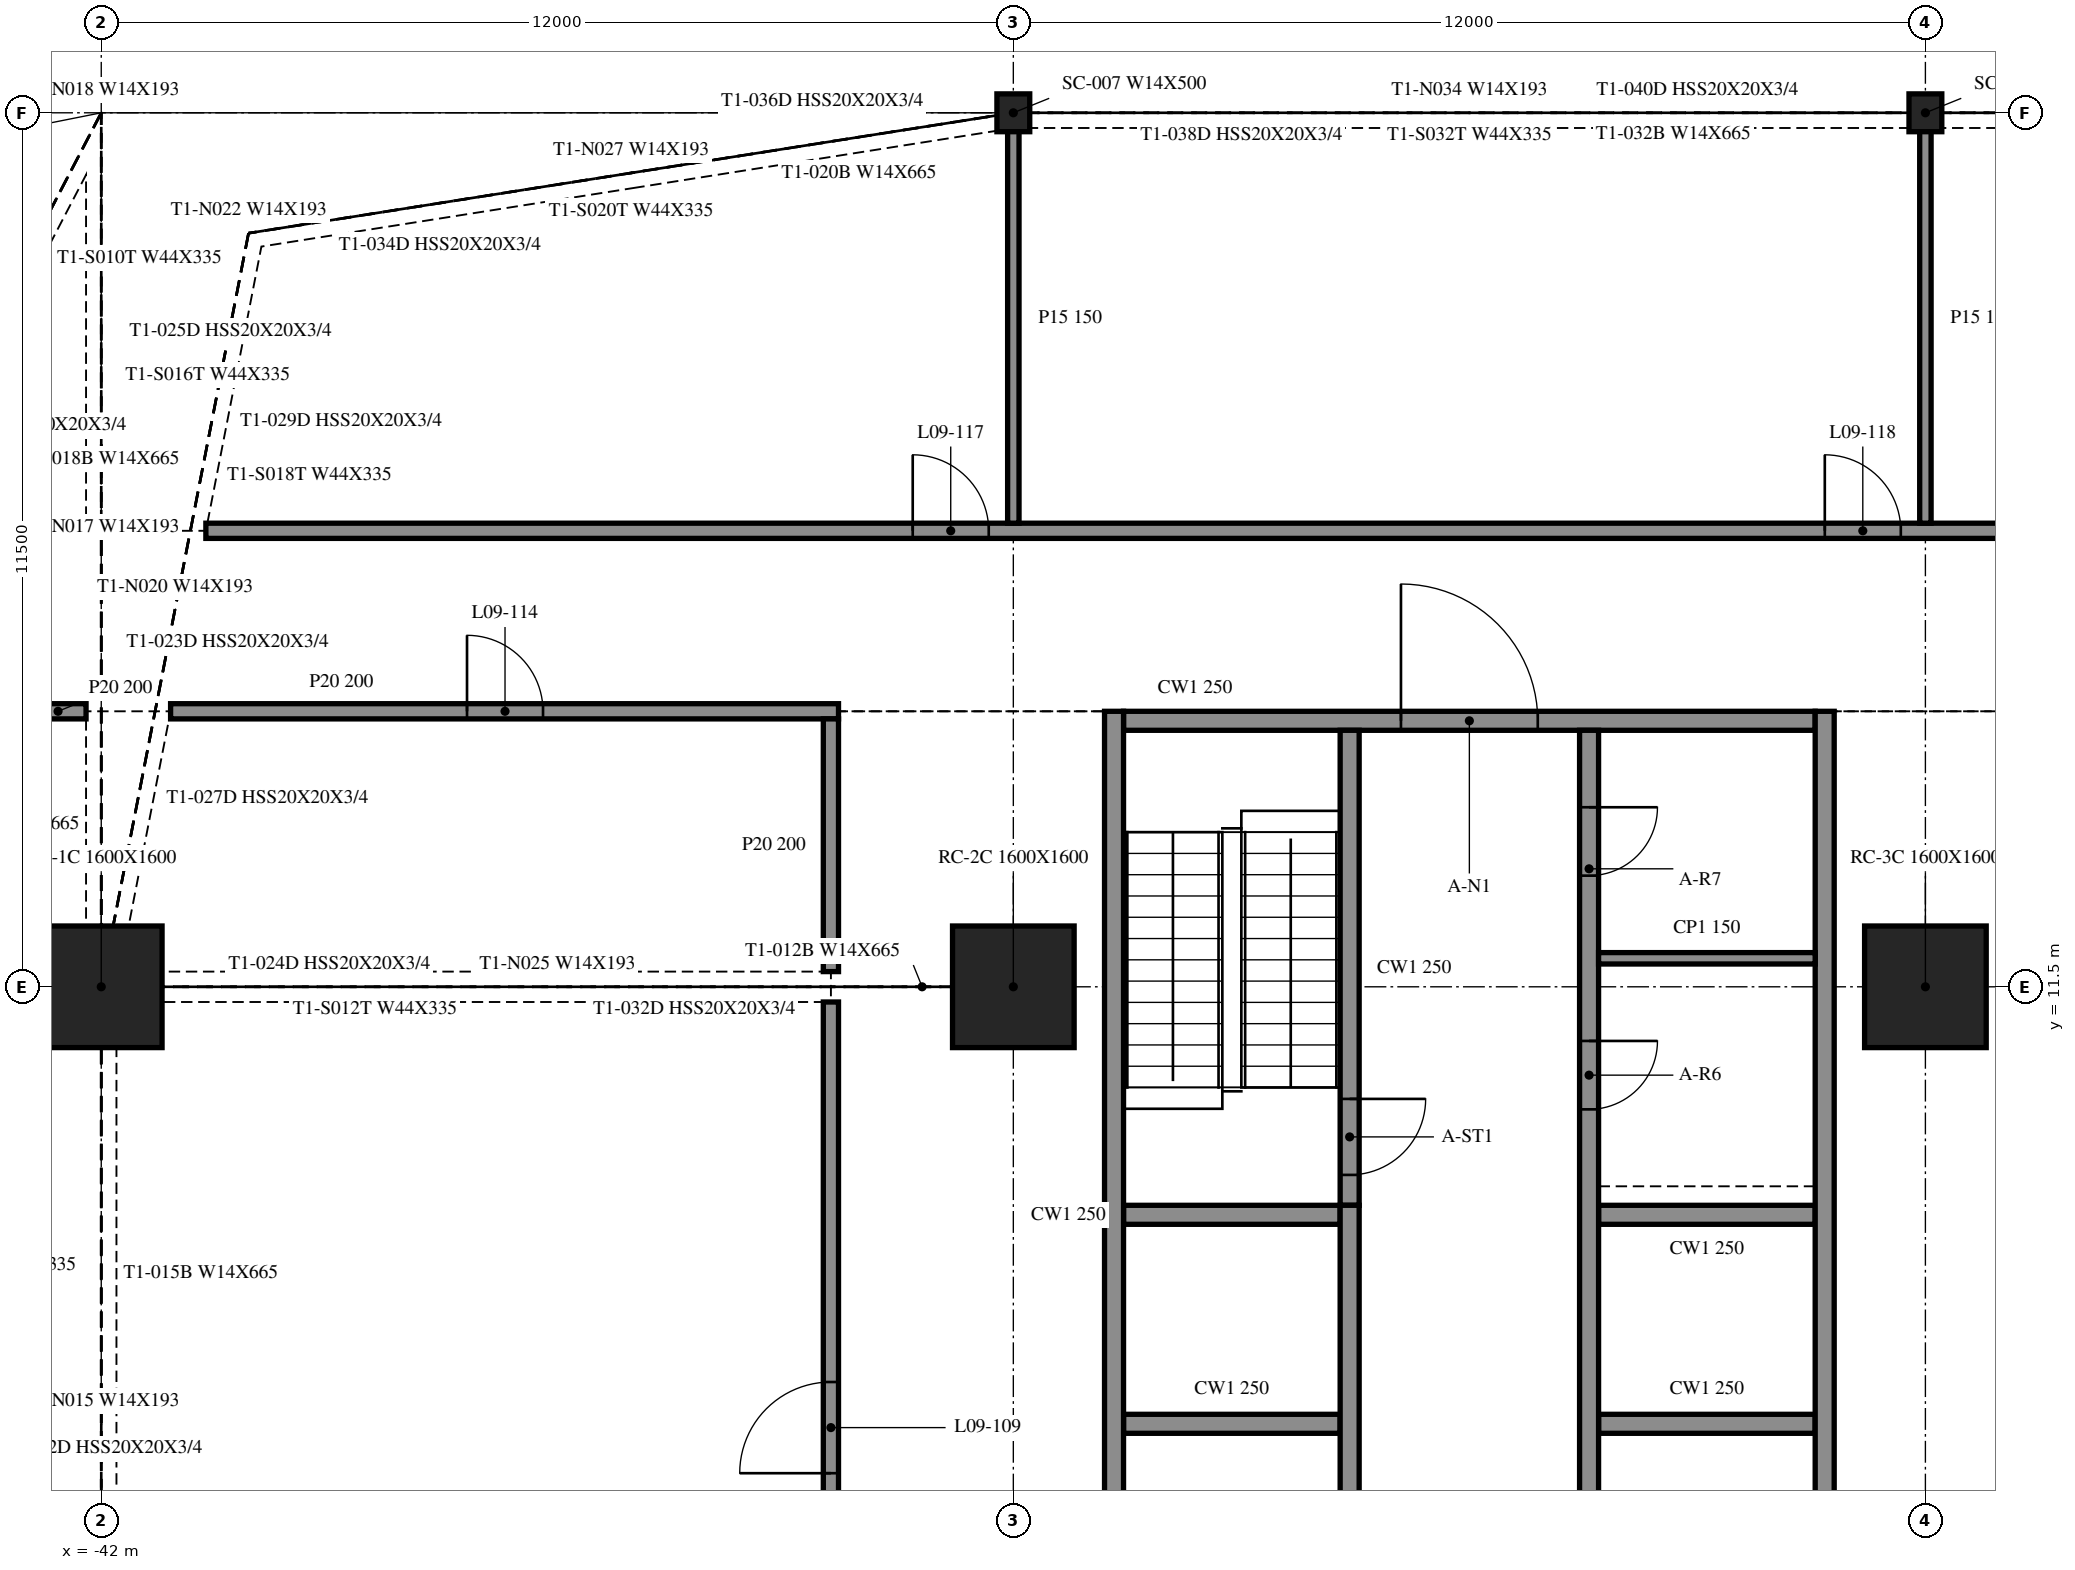
"""IFC4 building model, lengths in metres.
Left out: names, types, materials, properties, quantities, classifications, styles, units other than length and angle.
Written with IfcOpenShell. Run it as: python <this file> out.ifc"""

import sys

from ifc_helpers import new_model, si_unit, direction, frame, frame_2d, origin, origin_2d, place, context, subcontext, project, spatial, rectangle, i_section, extrude, element, fill, save


model = new_model("IFC4")
c1 = context("Model", 3, precision=1e-05, world=origin(), true_north=direction((0.0, 1.0)))
c2 = subcontext(c1, "Body", "Model", "MODEL_VIEW")
j1 = project(units=[si_unit("LENGTHUNIT", "METRE"), si_unit("PLANEANGLEUNIT", "RADIAN")], contexts=[c1])
p1 = place(None, origin())
s1 = spatial("IfcSite", under=j1, at=p1, CompositionType="ELEMENT")
p2 = place(p1, origin())
s2 = spatial("IfcBuilding", under=s1, at=p2, CompositionType="ELEMENT")
p3 = place(p2, frame((0.0, 0.0, 41.6)))
s3 = spatial("IfcBuildingStorey", under=s2, at=p3, CompositionType="ELEMENT", Elevation=41.6)
for number, where, z_axis, x_axis in (
    (1, (-42.0, 11.5, -0.55), (0.0, 0.0, 1.0), (1.0, 0.0, 0.0)),
    (2, (-30.0, 11.5, -0.55), (0.0, 0.0, 1.0), (1.0, 0.0, 0.0)),
    (3, (-18.0, 11.5, -0.55), (0.0, 0.0, 1.0), (1.0, 0.0, 0.0)),
):
    element("IfcColumn", number, at=place(p3, frame(where, z_axis=z_axis, x_axis=x_axis)), inside=s3, PredefinedType="COLUMN", context=c2, shape_type="SweptSolid", body=[
        extrude(rectangle(XDim=1.6, YDim=1.6, at=origin_2d()), origin(), (0.0, 0.0, 1.0), 4.61),
    ])
for number, where, z_axis, x_axis in (
    (4, (-18.0, 23.0, -0.55), (0.0, 0.0, 1.0), (1.0, 0.0, 0.0)),
    (5, (-30.0, 23.0, -0.55), (0.0, 0.0, 1.0), (1.0, 0.0, 0.0)),
):
    element("IfcColumn", number, at=place(p3, frame(where, z_axis=z_axis, x_axis=x_axis)), inside=s3, PredefinedType="COLUMN", context=c2, shape_type="SweptSolid", body=[
        extrude(i_section(OverallWidth=0.432, OverallDepth=0.498, WebThickness=0.056, FlangeThickness=0.089, at=origin_2d()), origin(), (0.0, 0.0, 1.0), 4.61),
    ])
for number, where, z_axis, x_axis in (
    (6, (-28.675, 15.125, 0.0), (0.0, 0.0, 1.0), (0.0, -1.0, 0.0)),
    (7, (-19.325, -9.125, 0.0), (0.0, 0.0, 1.0), (0.0, 1.0, 0.0)),
):
    element("IfcWall", number, at=place(p3, frame(where, z_axis=z_axis, x_axis=x_axis)), inside=s3, PredefinedType="SOLIDWALL", context=c2, shape_type="SweptSolid", body=[
        extrude(rectangle(XDim=24.25, YDim=0.25, at=frame_2d((12.125, 0.0))), origin(), (0.0, 0.0, 1.0), 4.06),
    ])
p4 = place(p3, frame((-28.55, 15.0, 0.0), z_axis=(0.0, 0.0, 1.0), x_axis=(1.0, 0.0, 0.0)))
e8 = element("IfcWall", 8, at=p4, inside=s3, PredefinedType="SOLIDWALL", context=c2, shape_type="SweptSolid", body=[
    extrude(rectangle(XDim=9.1, YDim=0.25, at=frame_2d((4.55, 0.0))), origin(), (0.0, 0.0, 1.0), 4.06),
])
p5 = place(p4, frame((3.65, 0.0, 0.0)))
e9 = element("IfcOpeningElement", 9, at=p5, cuts=e8, PredefinedType="OPENING", context=c2, shape_type="SweptSolid", body=[
    extrude(rectangle(XDim=1.8, YDim=2.1, at=frame_2d((0.9, 1.05))), frame((0.0, 0.135, 0.0), z_axis=(0.0, -1.0, 0.0), x_axis=(1.0, 0.0, 0.0)), (0.0, 0.0, 1.0), 0.27),
])
p6 = place(p3, frame((-25.575, -8.875, 0.0), z_axis=(0.0, 0.0, 1.0), x_axis=(0.0, 1.0, 0.0)))
e10 = element("IfcWall", 10, at=p6, inside=s3, PredefinedType="SOLIDWALL", context=c2, shape_type="SweptSolid", body=[
    extrude(rectangle(XDim=17.5, YDim=0.25, at=frame_2d((8.75, 0.0))), origin(), (0.0, 0.0, 1.0), 4.06),
])
p7 = place(p6, frame((0.512, 0.0, 0.0)))
e11 = element("IfcOpeningElement", 11, at=p7, cuts=e10, PredefinedType="OPENING", context=c2, shape_type="SweptSolid", body=[
    extrude(rectangle(XDim=0.9, YDim=2.1, at=frame_2d((0.45, 1.05))), frame((0.0, 0.135, 0.0), z_axis=(0.0, -1.0, 0.0), x_axis=(1.0, 0.0, 0.0)), (0.0, 0.0, 1.0), 0.27),
])
p8 = place(p6, frame((2.55, 0.0, 0.0)))
e12 = element("IfcOpeningElement", 12, at=p8, cuts=e10, PredefinedType="OPENING", context=c2, shape_type="SweptSolid", body=[
    extrude(rectangle(XDim=0.9, YDim=2.1, at=frame_2d((0.45, 1.05))), frame((0.0, 0.135, 0.0), z_axis=(0.0, -1.0, 0.0), x_axis=(1.0, 0.0, 0.0)), (0.0, 0.0, 1.0), 0.27),
])
p9 = place(p6, frame((4.587, 0.0, 0.0)))
e13 = element("IfcOpeningElement", 13, at=p9, cuts=e10, PredefinedType="OPENING", context=c2, shape_type="SweptSolid", body=[
    extrude(rectangle(XDim=0.9, YDim=2.1, at=frame_2d((0.45, 1.05))), frame((0.0, 0.135, 0.0), z_axis=(0.0, -1.0, 0.0), x_axis=(1.0, 0.0, 0.0)), (0.0, 0.0, 1.0), 0.27),
])
p10 = place(p3, frame((-25.575, 14.875, 0.0), z_axis=(0.0, 0.0, 1.0), x_axis=(0.0, -1.0, 0.0)))
e14 = element("IfcWall", 14, at=p10, inside=s3, PredefinedType="SOLIDWALL", context=c2, shape_type="SweptSolid", body=[
    extrude(rectangle(XDim=6.25, YDim=0.25, at=frame_2d((3.125, 0.0))), origin(), (0.0, 0.0, 1.0), 4.06),
])
p11 = place(p10, frame((4.85, 0.0, 0.0)))
e15 = element("IfcOpeningElement", 15, at=p11, cuts=e14, PredefinedType="OPENING", context=c2, shape_type="SweptSolid", body=[
    extrude(rectangle(XDim=1.0, YDim=2.1, at=frame_2d((0.5, 1.05))), frame((0.0, 0.135, 0.0), z_axis=(0.0, -1.0, 0.0), x_axis=(1.0, 0.0, 0.0)), (0.0, 0.0, 1.0), 0.27),
])
p12 = place(p3, frame((-22.425, 14.875, 0.0), z_axis=(0.0, 0.0, 1.0), x_axis=(0.0, -1.0, 0.0)))
e16 = element("IfcWall", 16, at=p12, inside=s3, PredefinedType="SOLIDWALL", context=c2, shape_type="SweptSolid", body=[
    extrude(rectangle(XDim=23.75, YDim=0.25, at=frame_2d((11.875, 0.0))), origin(), (0.0, 0.0, 1.0), 4.06),
])
p13 = place(p12, frame((21.597, 0.0, 0.0)))
e17 = element("IfcOpeningElement", 17, at=p13, cuts=e16, PredefinedType="OPENING", context=c2, shape_type="SweptSolid", body=[
    extrude(rectangle(XDim=0.9, YDim=2.1, at=frame_2d((0.45, 1.05))), frame((0.0, 0.135, 0.0), z_axis=(0.0, -1.0, 0.0), x_axis=(1.0, 0.0, 0.0)), (0.0, 0.0, 1.0), 0.27),
])
p14 = place(p12, frame((18.522, 0.0, 0.0)))
e18 = element("IfcOpeningElement", 18, at=p14, cuts=e16, PredefinedType="OPENING", context=c2, shape_type="SweptSolid", body=[
    extrude(rectangle(XDim=0.9, YDim=2.1, at=frame_2d((0.45, 1.05))), frame((0.0, 0.135, 0.0), z_axis=(0.0, -1.0, 0.0), x_axis=(1.0, 0.0, 0.0)), (0.0, 0.0, 1.0), 0.27),
])
p15 = place(p12, frame((4.087, 0.0, 0.0)))
e19 = element("IfcOpeningElement", 19, at=p15, cuts=e16, PredefinedType="OPENING", context=c2, shape_type="SweptSolid", body=[
    extrude(rectangle(XDim=0.9, YDim=2.1, at=frame_2d((0.45, 1.05))), frame((0.0, 0.135, 0.0), z_axis=(0.0, -1.0, 0.0), x_axis=(1.0, 0.0, 0.0)), (0.0, 0.0, 1.0), 0.27),
])
p16 = place(p12, frame((1.012, 0.0, 0.0)))
e20 = element("IfcOpeningElement", 20, at=p16, cuts=e16, PredefinedType="OPENING", context=c2, shape_type="SweptSolid", body=[
    extrude(rectangle(XDim=0.9, YDim=2.1, at=frame_2d((0.45, 1.05))), frame((0.0, 0.135, 0.0), z_axis=(0.0, -1.0, 0.0), x_axis=(1.0, 0.0, 0.0)), (0.0, 0.0, 1.0), 0.27),
])
for number, where, z_axis, x_axis in (
    (21, (-28.55, 5.75, 0.0), (0.0, 0.0, 1.0), (1.0, 0.0, 0.0)),
    (22, (-28.55, 8.5, 0.0), (0.0, 0.0, 1.0), (1.0, 0.0, 0.0)),
    (23, (-22.3, 5.75, 0.0), (0.0, 0.0, 1.0), (1.0, 0.0, 0.0)),
    (24, (-22.3, 8.5, 0.0), (0.0, 0.0, 1.0), (1.0, 0.0, 0.0)),
):
    element("IfcWall", number, at=place(p3, frame(where, z_axis=z_axis, x_axis=x_axis)), inside=s3, PredefinedType="SOLIDWALL", context=c2, shape_type="SweptSolid", body=[
        extrude(rectangle(XDim=2.85, YDim=0.25, at=frame_2d((1.425, 0.0))), origin(), (0.0, 0.0, 1.0), 4.06),
    ])
p17 = place(p3, frame((-22.3, 11.875, 0.0), z_axis=(0.0, 0.0, 1.0), x_axis=(1.0, 0.0, 0.0)))
e25 = element("IfcWall", 25, at=p17, inside=s3, PredefinedType="PARTITIONING", context=c2, shape_type="SweptSolid", body=[
    extrude(rectangle(XDim=2.85, YDim=0.15, at=frame_2d((1.425, 0.0))), origin(), (0.0, 0.0, 1.0), 4.06),
])
p18 = place(p3, frame((-45.883, 15.125, 0.0), z_axis=(0.0, 0.0, 1.0), x_axis=(1.0, 0.0, 0.0)))
e26 = element("IfcWall", 26, at=p18, inside=s3, PredefinedType="PARTITIONING", context=c2, shape_type="SweptSolid", body=[
    extrude(rectangle(XDim=3.683, YDim=0.2, at=frame_2d((1.841, 0.0))), origin(), (0.0, 0.0, 1.0), 4.06),
])
p19 = place(p18, frame((1.3, 0.0, 0.0)))
e27 = element("IfcOpeningElement", 27, at=p19, cuts=e26, PredefinedType="OPENING", context=c2, shape_type="SweptSolid", body=[
    extrude(rectangle(XDim=1.0, YDim=2.1, at=frame_2d((0.5, 1.05))), frame((0.0, 0.11, 0.0), z_axis=(0.0, -1.0, 0.0), x_axis=(1.0, 0.0, 0.0)), (0.0, 0.0, 1.0), 0.22),
])
p20 = place(p3, frame((-41.088, 15.125, 0.0), z_axis=(0.0, 0.0, 1.0), x_axis=(1.0, 0.0, 0.0)))
e28 = element("IfcWall", 28, at=p20, inside=s3, PredefinedType="PARTITIONING", context=c2, shape_type="SweptSolid", body=[
    extrude(rectangle(XDim=8.788, YDim=0.2, at=frame_2d((4.394, 0.0))), origin(), (0.0, 0.0, 1.0), 4.06),
])
p21 = place(p20, frame((3.9, 0.0, 0.0)))
e29 = element("IfcOpeningElement", 29, at=p21, cuts=e28, PredefinedType="OPENING", context=c2, shape_type="SweptSolid", body=[
    extrude(rectangle(XDim=1.0, YDim=2.1, at=frame_2d((0.5, 1.05))), frame((0.0, 0.11, 0.0), z_axis=(0.0, -1.0, 0.0), x_axis=(1.0, 0.0, 0.0)), (0.0, 0.0, 1.0), 0.22),
])
p22 = place(p3, frame((-40.624, 17.5, 0.0), z_axis=(0.0, 0.0, 1.0), x_axis=(1.0, 0.0, 0.0)))
e30 = element("IfcWall", 30, at=p22, inside=s3, PredefinedType="PARTITIONING", context=c2, shape_type="SweptSolid", body=[
    extrude(rectangle(XDim=94.524, YDim=0.2, at=frame_2d((47.262, 0.0))), origin(), (0.0, 0.0, 1.0), 4.06),
])
p23 = place(p22, frame((9.3, 0.0, 0.0)))
e31 = element("IfcOpeningElement", 31, at=p23, cuts=e30, PredefinedType="OPENING", context=c2, shape_type="SweptSolid", body=[
    extrude(rectangle(XDim=1.0, YDim=2.1, at=frame_2d((0.5, 1.05))), frame((0.0, 0.11, 0.0), z_axis=(0.0, -1.0, 0.0), x_axis=(1.0, 0.0, 0.0)), (0.0, 0.0, 1.0), 0.22),
])
p24 = place(p22, frame((21.3, 0.0, 0.0)))
e32 = element("IfcOpeningElement", 32, at=p24, cuts=e30, PredefinedType="OPENING", context=c2, shape_type="SweptSolid", body=[
    extrude(rectangle(XDim=1.0, YDim=2.1, at=frame_2d((0.5, 1.05))), frame((0.0, 0.11, 0.0), z_axis=(0.0, -1.0, 0.0), x_axis=(1.0, 0.0, 0.0)), (0.0, 0.0, 1.0), 0.22),
])
p25 = place(p22, frame((33.5, 0.0, 0.0)))
e33 = element("IfcOpeningElement", 33, at=p25, cuts=e30, PredefinedType="OPENING", context=c2, shape_type="SweptSolid", body=[
    extrude(rectangle(XDim=0.9, YDim=2.1, at=frame_2d((0.45, 1.05))), frame((0.0, 0.11, 0.0), z_axis=(0.0, -1.0, 0.0), x_axis=(1.0, 0.0, 0.0)), (0.0, 0.0, 1.0), 0.22),
])
p26 = place(p22, frame((45.1, 0.0, 0.0)))
e34 = element("IfcOpeningElement", 34, at=p26, cuts=e30, PredefinedType="OPENING", context=c2, shape_type="SweptSolid", body=[
    extrude(rectangle(XDim=1.2, YDim=2.1, at=frame_2d((0.6, 1.05))), frame((0.0, 0.11, 0.0), z_axis=(0.0, -1.0, 0.0), x_axis=(1.0, 0.0, 0.0)), (0.0, 0.0, 1.0), 0.22),
])
p27 = place(p22, frame((46.9, 0.0, 0.0)))
e35 = element("IfcOpeningElement", 35, at=p27, cuts=e30, PredefinedType="OPENING", context=c2, shape_type="SweptSolid", body=[
    extrude(rectangle(XDim=1.2, YDim=2.1, at=frame_2d((0.6, 1.05))), frame((0.0, 0.11, 0.0), z_axis=(0.0, -1.0, 0.0), x_axis=(1.0, 0.0, 0.0)), (0.0, 0.0, 1.0), 0.22),
])
p28 = place(p22, frame((58.9, 0.0, 0.0)))
e36 = element("IfcOpeningElement", 36, at=p28, cuts=e30, PredefinedType="OPENING", context=c2, shape_type="SweptSolid", body=[
    extrude(rectangle(XDim=1.2, YDim=2.1, at=frame_2d((0.6, 1.05))), frame((0.0, 0.11, 0.0), z_axis=(0.0, -1.0, 0.0), x_axis=(1.0, 0.0, 0.0)), (0.0, 0.0, 1.0), 0.22),
])
p29 = place(p22, frame((70.9, 0.0, 0.0)))
e37 = element("IfcOpeningElement", 37, at=p29, cuts=e30, PredefinedType="OPENING", context=c2, shape_type="SweptSolid", body=[
    extrude(rectangle(XDim=1.0, YDim=2.1, at=frame_2d((0.5, 1.05))), frame((0.0, 0.11, 0.0), z_axis=(0.0, -1.0, 0.0), x_axis=(1.0, 0.0, 0.0)), (0.0, 0.0, 1.0), 0.22),
])
p30 = place(p22, frame((82.9, 0.0, 0.0)))
e38 = element("IfcOpeningElement", 38, at=p30, cuts=e30, PredefinedType="OPENING", context=c2, shape_type="SweptSolid", body=[
    extrude(rectangle(XDim=1.0, YDim=2.1, at=frame_2d((0.5, 1.05))), frame((0.0, 0.11, 0.0), z_axis=(0.0, -1.0, 0.0), x_axis=(1.0, 0.0, 0.0)), (0.0, 0.0, 1.0), 0.22),
])
p31 = place(p3, frame((-32.4, 0.2, 0.0), z_axis=(0.0, 0.0, 1.0), x_axis=(0.0, 1.0, 0.0)))
e39 = element("IfcWall", 39, at=p31, inside=s3, PredefinedType="PARTITIONING", context=c2, shape_type="SweptSolid", body=[
    extrude(rectangle(XDim=11.1, YDim=0.2, at=frame_2d((5.55, 0.0))), origin(), (0.0, 0.0, 1.0), 4.06),
])
p32 = place(p31, frame((4.9, 0.0, 0.0)))
e40 = element("IfcOpeningElement", 40, at=p32, cuts=e39, PredefinedType="OPENING", context=c2, shape_type="SweptSolid", body=[
    extrude(rectangle(XDim=1.2, YDim=2.1, at=frame_2d((0.6, 1.05))), frame((0.0, 0.11, 0.0), z_axis=(0.0, -1.0, 0.0), x_axis=(1.0, 0.0, 0.0)), (0.0, 0.0, 1.0), 0.22),
])
p33 = place(p3, frame((-32.4, 11.7, 0.0), z_axis=(0.0, 0.0, 1.0), x_axis=(0.0, 1.0, 0.0)))
e41 = element("IfcWall", 41, at=p33, inside=s3, PredefinedType="PARTITIONING", context=c2, shape_type="SweptSolid", body=[
    extrude(rectangle(XDim=3.325, YDim=0.2, at=frame_2d((1.663, 0.0))), origin(), (0.0, 0.0, 1.0), 4.06),
])
for number, where, z_axis, x_axis in (
    (42, (-30.0, 17.6, 0.0), (0.0, 0.0, 1.0), (0.0, 1.0, 0.0)),
    (43, (-18.0, 17.6, 0.0), (0.0, 0.0, 1.0), (0.0, 1.0, 0.0)),
):
    element("IfcWall", number, at=place(p3, frame(where, z_axis=z_axis, x_axis=x_axis)), inside=s3, PredefinedType="PARTITIONING", context=c2, shape_type="SweptSolid", body=[
        extrude(rectangle(XDim=5.4, YDim=0.15, at=frame_2d((2.7, 0.0))), origin(), (0.0, 0.0, 1.0), 4.06),
    ])
p34 = place(p5, origin())
e44 = element("IfcDoor", 44, at=p34, inside=s3, OperationType="DOUBLE_DOOR_SINGLE_SWING", PredefinedType="DOOR", context=c2, shape_type="SweptSolid", body=[
    extrude(rectangle(XDim=1.8, YDim=2.1, at=frame_2d((0.9, 1.05))), frame((0.0, 0.025, 0.0), z_axis=(0.0, -1.0, 0.0), x_axis=(1.0, 0.0, 0.0)), (0.0, 0.0, 1.0), 0.05),
])
fill(e9, e44)
p35 = place(p15, origin())
e45 = element("IfcDoor", 45, at=p35, inside=s3, OperationType="SINGLE_SWING_RIGHT", PredefinedType="DOOR", context=c2, shape_type="SweptSolid", body=[
    extrude(rectangle(XDim=0.9, YDim=2.1, at=frame_2d((0.45, 1.05))), frame((0.0, 0.025, 0.0), z_axis=(0.0, -1.0, 0.0), x_axis=(1.0, 0.0, 0.0)), (0.0, 0.0, 1.0), 0.05),
])
fill(e19, e45)
p36 = place(p16, origin())
e46 = element("IfcDoor", 46, at=p36, inside=s3, OperationType="SINGLE_SWING_LEFT", PredefinedType="DOOR", context=c2, shape_type="SweptSolid", body=[
    extrude(rectangle(XDim=0.9, YDim=2.1, at=frame_2d((0.45, 1.05))), frame((0.0, 0.025, 0.0), z_axis=(0.0, -1.0, 0.0), x_axis=(1.0, 0.0, 0.0)), (0.0, 0.0, 1.0), 0.05),
])
fill(e20, e46)
p37 = place(p11, origin())
e47 = element("IfcDoor", 47, at=p37, inside=s3, OperationType="SINGLE_SWING_RIGHT", PredefinedType="DOOR", context=c2, shape_type="SweptSolid", body=[
    extrude(rectangle(XDim=1.0, YDim=2.1, at=frame_2d((0.5, 1.05))), frame((0.0, 0.025, 0.0), z_axis=(0.0, -1.0, 0.0), x_axis=(1.0, 0.0, 0.0)), (0.0, 0.0, 1.0), 0.05),
])
fill(e15, e47)
p38 = place(p32, origin())
e48 = element("IfcDoor", 48, at=p38, inside=s3, OperationType="SINGLE_SWING_LEFT", PredefinedType="DOOR", context=c2, shape_type="SweptSolid", body=[
    extrude(rectangle(XDim=1.2, YDim=2.1, at=frame_2d((0.6, 1.05))), frame((0.0, 0.025, 0.0), z_axis=(0.0, -1.0, 0.0), x_axis=(1.0, 0.0, 0.0)), (0.0, 0.0, 1.0), 0.05),
])
fill(e40, e48)
p39 = place(p21, origin())
e49 = element("IfcDoor", 49, at=p39, inside=s3, OperationType="SINGLE_SWING_LEFT", PredefinedType="DOOR", context=c2, shape_type="SweptSolid", body=[
    extrude(rectangle(XDim=1.0, YDim=2.1, at=frame_2d((0.5, 1.05))), frame((0.0, 0.025, 0.0), z_axis=(0.0, -1.0, 0.0), x_axis=(1.0, 0.0, 0.0)), (0.0, 0.0, 1.0), 0.05),
])
fill(e29, e49)
p40 = place(p23, origin())
e50 = element("IfcDoor", 50, at=p40, inside=s3, OperationType="SINGLE_SWING_LEFT", PredefinedType="DOOR", context=c2, shape_type="SweptSolid", body=[
    extrude(rectangle(XDim=1.0, YDim=2.1, at=frame_2d((0.5, 1.05))), frame((0.0, 0.025, 0.0), z_axis=(0.0, -1.0, 0.0), x_axis=(1.0, 0.0, 0.0)), (0.0, 0.0, 1.0), 0.05),
])
fill(e31, e50)
p41 = place(p24, origin())
e51 = element("IfcDoor", 51, at=p41, inside=s3, OperationType="SINGLE_SWING_LEFT", PredefinedType="DOOR", context=c2, shape_type="SweptSolid", body=[
    extrude(rectangle(XDim=1.0, YDim=2.1, at=frame_2d((0.5, 1.05))), frame((0.0, 0.025, 0.0), z_axis=(0.0, -1.0, 0.0), x_axis=(1.0, 0.0, 0.0)), (0.0, 0.0, 1.0), 0.05),
])
fill(e32, e51)
save(model, sys.argv[1])
